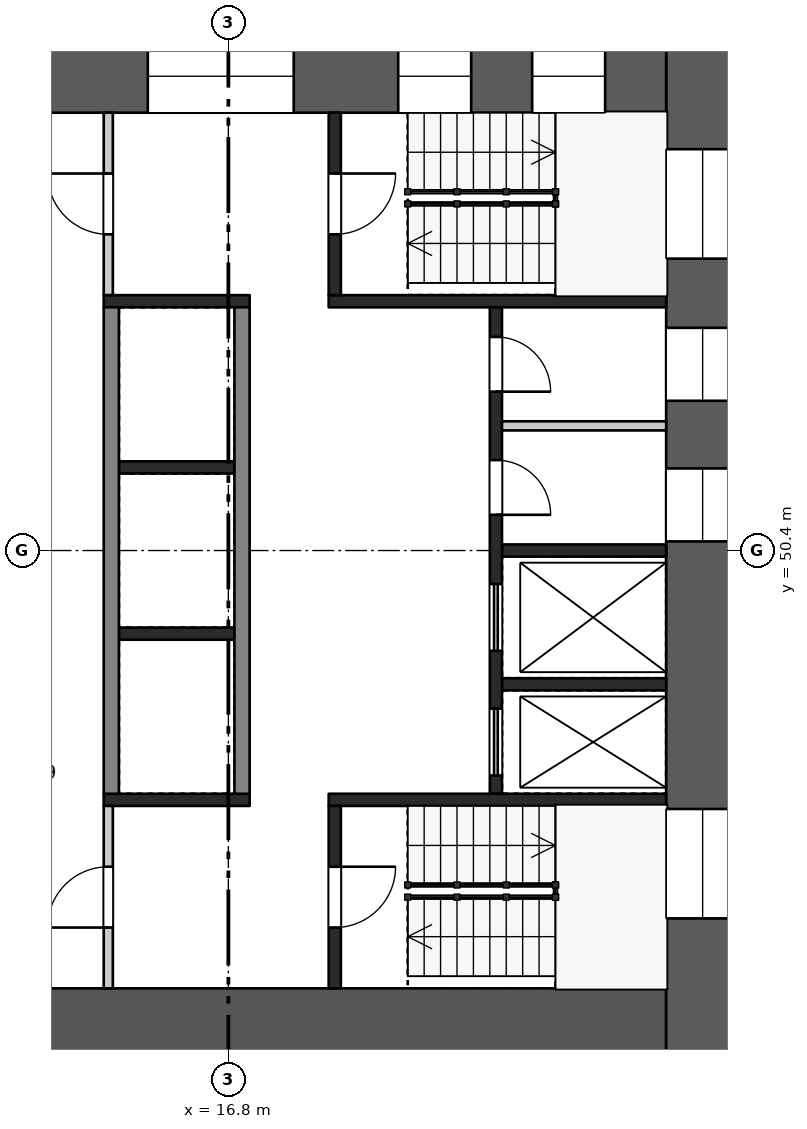
"""IFC4 building model, lengths in metres.
Left out: names, types, materials, properties, quantities, classifications, styles, units other than length and angle.
Written with IfcOpenShell. Run it as: python <this file> out.ifc"""

import sys

from ifc_helpers import new_model, si_unit, direction, frame, frame_2d, origin, place, context, subcontext, project, spatial, rectangle, extrude, element, fill, save


model = new_model("IFC4")
c1 = context("Model", 3, precision=1e-05, world=origin(), true_north=direction((0.0, 1.0)))
c2 = subcontext(c1, "Body", "Model", "MODEL_VIEW")
j1 = project(units=[si_unit("LENGTHUNIT", "METRE"), si_unit("PLANEANGLEUNIT", "RADIAN")], contexts=[c1])
p1 = place(None, origin())
s1 = spatial("IfcSite", under=j1, at=p1, CompositionType="ELEMENT")
p2 = place(p1, origin())
s2 = spatial("IfcBuilding", under=s1, at=p2, CompositionType="ELEMENT")
p3 = place(p2, frame((0.0, 0.0, 67.2)))
s3 = spatial("IfcBuildingStorey", under=s2, at=p3, CompositionType="ELEMENT", Elevation=67.2)
p4 = place(p3, frame((24.6, 58.8, 0.0), z_axis=(0.0, 0.0, 1.0), x_axis=(0.0, -1.0, 0.0)))
e1 = element("IfcWall", 1, at=p4, inside=s3, PredefinedType="SHEAR", context=c2, shape_type="SweptSolid", body=[
    extrude(rectangle(XDim=16.8, YDim=1.2, at=frame_2d((8.4, 0.0))), origin(), (0.0, 0.0, 1.0), 3.22),
])
p5 = place(p4, frame((1.8, 0.0, 0.5)))
e2 = element("IfcOpeningElement", 2, at=p5, cuts=e1, PredefinedType="OPENING", context=c2, shape_type="SweptSolid", body=[
    extrude(rectangle(XDim=1.8, YDim=2.4, at=frame_2d((0.9, 1.2))), frame((0.0, 0.61, 0.0), z_axis=(0.0, -1.0, 0.0), x_axis=(1.0, 0.0, 0.0)), (0.0, 0.0, 1.0), 1.22),
])
p6 = place(p4, frame((4.738, 0.0, 1.6)))
e3 = element("IfcOpeningElement", 3, at=p6, cuts=e1, PredefinedType="OPENING", context=c2, shape_type="SweptSolid", body=[
    extrude(rectangle(XDim=1.2, YDim=1.2, at=frame_2d((0.6, 0.6))), frame((0.0, 0.61, 0.0), z_axis=(0.0, -1.0, 0.0), x_axis=(1.0, 0.0, 0.0)), (0.0, 0.0, 1.0), 1.22),
])
p7 = place(p4, frame((7.05, 0.0, 1.6)))
e4 = element("IfcOpeningElement", 4, at=p7, cuts=e1, PredefinedType="OPENING", context=c2, shape_type="SweptSolid", body=[
    extrude(rectangle(XDim=1.2, YDim=1.2, at=frame_2d((0.6, 0.6))), frame((0.0, 0.61, 0.0), z_axis=(0.0, -1.0, 0.0), x_axis=(1.0, 0.0, 0.0)), (0.0, 0.0, 1.0), 1.22),
])
p8 = place(p4, frame((12.65, 0.0, 0.5)))
e5 = element("IfcOpeningElement", 5, at=p8, cuts=e1, PredefinedType="OPENING", context=c2, shape_type="SweptSolid", body=[
    extrude(rectangle(XDim=1.8, YDim=2.4, at=frame_2d((0.9, 1.2))), frame((0.0, 0.61, 0.0), z_axis=(0.0, -1.0, 0.0), x_axis=(1.0, 0.0, 0.0)), (0.0, 0.0, 1.0), 1.22),
])
p9 = place(p3, frame((9.6, 58.2, 0.0), z_axis=(0.0, 0.0, 1.0), x_axis=(1.0, 0.0, 0.0)))
e6 = element("IfcWall", 6, at=p9, inside=s3, PredefinedType="SHEAR", context=c2, shape_type="SweptSolid", body=[
    extrude(rectangle(XDim=14.4, YDim=1.2, at=frame_2d((7.2, 0.0))), origin(), (0.0, 0.0, 1.0), 3.22),
])
p10 = place(p9, frame((1.105, 0.0, 0.6)))
e7 = element("IfcOpeningElement", 7, at=p10, cuts=e6, PredefinedType="OPENING", context=c2, shape_type="SweptSolid", body=[
    extrude(rectangle(XDim=3.0, YDim=2.1, at=frame_2d((1.5, 1.05))), frame((0.0, 0.61, 0.0), z_axis=(0.0, -1.0, 0.0), x_axis=(1.0, 0.0, 0.0)), (0.0, 0.0, 1.0), 1.22),
])
p11 = place(p9, frame((5.875, 0.0, 0.6)))
e8 = element("IfcOpeningElement", 8, at=p11, cuts=e6, PredefinedType="OPENING", context=c2, shape_type="SweptSolid", body=[
    extrude(rectangle(XDim=2.4, YDim=2.1, at=frame_2d((1.2, 1.05))), frame((0.0, 0.61, 0.0), z_axis=(0.0, -1.0, 0.0), x_axis=(1.0, 0.0, 0.0)), (0.0, 0.0, 1.0), 1.22),
])
p12 = place(p9, frame((9.993, 0.0, 0.5)))
e9 = element("IfcOpeningElement", 9, at=p12, cuts=e6, PredefinedType="OPENING", context=c2, shape_type="SweptSolid", body=[
    extrude(rectangle(XDim=1.2, YDim=2.4, at=frame_2d((0.6, 1.2))), frame((0.0, 0.61, 0.0), z_axis=(0.0, -1.0, 0.0), x_axis=(1.0, 0.0, 0.0)), (0.0, 0.0, 1.0), 1.22),
])
p13 = place(p9, frame((12.197, 0.0, 0.5)))
e10 = element("IfcOpeningElement", 10, at=p13, cuts=e6, PredefinedType="OPENING", context=c2, shape_type="SweptSolid", body=[
    extrude(rectangle(XDim=1.2, YDim=2.4, at=frame_2d((0.6, 1.2))), frame((0.0, 0.61, 0.0), z_axis=(0.0, -1.0, 0.0), x_axis=(1.0, 0.0, 0.0)), (0.0, 0.0, 1.0), 1.22),
])
p14 = place(p3, frame((9.6, 42.6, 0.0), z_axis=(0.0, 0.0, 1.0), x_axis=(1.0, 0.0, 0.0)))
e11 = element("IfcWall", 11, at=p14, inside=s3, PredefinedType="SHEAR", context=c2, shape_type="SweptSolid", body=[
    extrude(rectangle(XDim=14.4, YDim=1.2, at=frame_2d((7.2, 0.0))), origin(), (0.0, 0.0, 1.0), 3.22),
])
p15 = place(p14, frame((2.1, 0.0, 0.0)))
e12 = element("IfcOpeningElement", 12, at=p15, cuts=e11, PredefinedType="OPENING", context=c2, shape_type="SweptSolid", body=[
    extrude(rectangle(XDim=1.8, YDim=2.1, at=frame_2d((0.9, 1.05))), frame((0.0, 0.61, 0.0), z_axis=(0.0, -1.0, 0.0), x_axis=(1.0, 0.0, 0.0)), (0.0, 0.0, 1.0), 1.22),
])
for number, where, z_axis, x_axis in (
    (13, (15.0, 51.767, 0.0), (0.0, 0.0, 1.0), (1.0, 0.0, 0.0)),
    (14, (15.0, 49.033, 0.0), (0.0, 0.0, 1.0), (1.0, 0.0, 0.0)),
):
    element("IfcWall", number, at=place(p3, frame(where, z_axis=z_axis, x_axis=x_axis)), inside=s3, PredefinedType="SHEAR", context=c2, shape_type="SweptSolid", body=[
        extrude(rectangle(XDim=1.9, YDim=0.2, at=frame_2d((0.95, 0.0))), origin(), (0.0, 0.0, 1.0), 3.22),
    ])
for number, where, z_axis, x_axis in (
    (15, (14.875, 54.4, 0.0), (0.0, 0.0, 1.0), (0.0, -1.0, 0.0)),
    (16, (17.025, 54.4, 0.0), (0.0, 0.0, 1.0), (0.0, -1.0, 0.0)),
):
    element("IfcWall", number, at=place(p3, frame(where, z_axis=z_axis, x_axis=x_axis)), inside=s3, PredefinedType="SHEAR", context=c2, shape_type="SweptSolid", body=[
        extrude(rectangle(XDim=8.0, YDim=0.25, at=frame_2d((4.0, 0.0))), origin(), (0.0, 0.0, 1.0), 3.22),
    ])
for number, where, z_axis, x_axis in (
    (17, (21.3, 50.4, 0.0), (0.0, 0.0, 1.0), (1.0, 0.0, 0.0)),
    (18, (21.3, 48.2, 0.0), (0.0, 0.0, 1.0), (1.0, 0.0, 0.0)),
):
    element("IfcWall", number, at=place(p3, frame(where, z_axis=z_axis, x_axis=x_axis)), inside=s3, PredefinedType="SHEAR", context=c2, shape_type="SweptSolid", body=[
        extrude(rectangle(XDim=2.7, YDim=0.2, at=frame_2d((1.35, 0.0))), origin(), (0.0, 0.0, 1.0), 3.22),
    ])
p16 = place(p3, frame((21.3, 52.45, 0.0), z_axis=(0.0, 0.0, 1.0), x_axis=(1.0, 0.0, 0.0)))
e19 = element("IfcWall", 19, at=p16, inside=s3, PredefinedType="PARTITIONING", context=c2, shape_type="SweptSolid", body=[
    extrude(rectangle(XDim=2.7, YDim=0.15, at=frame_2d((1.35, 0.0))), origin(), (0.0, 0.0, 1.0), 3.22),
])
p17 = place(p3, frame((21.2, 54.4, 0.0), z_axis=(0.0, 0.0, 1.0), x_axis=(0.0, -1.0, 0.0)))
e20 = element("IfcWall", 20, at=p17, inside=s3, PredefinedType="SHEAR", context=c2, shape_type="SweptSolid", body=[
    extrude(rectangle(XDim=8.0, YDim=0.2, at=frame_2d((4.0, 0.0))), origin(), (0.0, 0.0, 1.0), 3.22),
])
p18 = place(p17, frame((0.488, 0.0, 0.0)))
e21 = element("IfcOpeningElement", 21, at=p18, cuts=e20, PredefinedType="OPENING", context=c2, shape_type="SweptSolid", body=[
    extrude(rectangle(XDim=0.9, YDim=2.1, at=frame_2d((0.45, 1.05))), frame((0.0, 0.11, 0.0), z_axis=(0.0, -1.0, 0.0), x_axis=(1.0, 0.0, 0.0)), (0.0, 0.0, 1.0), 0.22),
])
p19 = place(p17, frame((2.512, 0.0, 0.0)))
e22 = element("IfcOpeningElement", 22, at=p19, cuts=e20, PredefinedType="OPENING", context=c2, shape_type="SweptSolid", body=[
    extrude(rectangle(XDim=0.9, YDim=2.1, at=frame_2d((0.45, 1.05))), frame((0.0, 0.11, 0.0), z_axis=(0.0, -1.0, 0.0), x_axis=(1.0, 0.0, 0.0)), (0.0, 0.0, 1.0), 0.22),
])
p20 = place(p17, frame((4.55, 0.0, 0.0)))
e23 = element("IfcOpeningElement", 23, at=p20, cuts=e20, PredefinedType="OPENING", context=c2, shape_type="SweptSolid", body=[
    extrude(rectangle(XDim=1.1, YDim=2.1, at=frame_2d((0.55, 1.05))), frame((0.0, 0.11, 0.0), z_axis=(0.0, -1.0, 0.0), x_axis=(1.0, 0.0, 0.0)), (0.0, 0.0, 1.0), 0.22),
])
p21 = place(p17, frame((6.6, 0.0, 0.0)))
e24 = element("IfcOpeningElement", 24, at=p21, cuts=e20, PredefinedType="OPENING", context=c2, shape_type="SweptSolid", body=[
    extrude(rectangle(XDim=1.1, YDim=2.1, at=frame_2d((0.55, 1.05))), frame((0.0, 0.11, 0.0), z_axis=(0.0, -1.0, 0.0), x_axis=(1.0, 0.0, 0.0)), (0.0, 0.0, 1.0), 0.22),
])
p22 = place(p3, frame((14.75, 54.5, 0.0), z_axis=(0.0, 0.0, 1.0), x_axis=(1.0, 0.0, 0.0)))
e25 = element("IfcWall", 25, at=p22, inside=s3, PredefinedType="SHEAR", context=c2, shape_type="SweptSolid", body=[
    extrude(rectangle(XDim=2.4, YDim=0.2, at=frame_2d((1.2, 0.0))), origin(), (0.0, 0.0, 1.0), 3.22),
])
p23 = place(p3, frame((18.45, 54.5, 0.0), z_axis=(0.0, 0.0, 1.0), x_axis=(1.0, 0.0, 0.0)))
e26 = element("IfcWall", 26, at=p23, inside=s3, PredefinedType="SHEAR", context=c2, shape_type="SweptSolid", body=[
    extrude(rectangle(XDim=5.55, YDim=0.2, at=frame_2d((2.775, 0.0))), origin(), (0.0, 0.0, 1.0), 3.22),
])
p24 = place(p3, frame((14.825, 57.6, 0.0), z_axis=(0.0, 0.0, 1.0), x_axis=(0.0, -1.0, 0.0)))
e27 = element("IfcWall", 27, at=p24, inside=s3, PredefinedType="PARTITIONING", context=c2, shape_type="SweptSolid", body=[
    extrude(rectangle(XDim=3.0, YDim=0.15, at=frame_2d((1.5, 0.0))), origin(), (0.0, 0.0, 1.0), 3.22),
])
p25 = place(p24, frame((1.0, 0.0, 0.0)))
e28 = element("IfcOpeningElement", 28, at=p25, cuts=e27, PredefinedType="OPENING", context=c2, shape_type="SweptSolid", body=[
    extrude(rectangle(XDim=1.0, YDim=2.1, at=frame_2d((0.5, 1.05))), frame((0.0, 0.085, 0.0), z_axis=(0.0, -1.0, 0.0), x_axis=(1.0, 0.0, 0.0)), (0.0, 0.0, 1.0), 0.17),
])
p26 = place(p3, frame((18.55, 57.6, 0.0), z_axis=(0.0, 0.0, 1.0), x_axis=(0.0, -1.0, 0.0)))
e29 = element("IfcWall", 29, at=p26, inside=s3, PredefinedType="SHEAR", context=c2, shape_type="SweptSolid", body=[
    extrude(rectangle(XDim=3.0, YDim=0.2, at=frame_2d((1.5, 0.0))), origin(), (0.0, 0.0, 1.0), 3.22),
])
p27 = place(p26, frame((1.0, 0.0, 0.0)))
e30 = element("IfcOpeningElement", 30, at=p27, cuts=e29, PredefinedType="OPENING", context=c2, shape_type="SweptSolid", body=[
    extrude(rectangle(XDim=1.0, YDim=2.1, at=frame_2d((0.5, 1.05))), frame((0.0, 0.11, 0.0), z_axis=(0.0, -1.0, 0.0), x_axis=(1.0, 0.0, 0.0)), (0.0, 0.0, 1.0), 0.22),
])
p28 = place(p3, frame((14.75, 46.3, 0.0), z_axis=(0.0, 0.0, 1.0), x_axis=(1.0, 0.0, 0.0)))
e31 = element("IfcWall", 31, at=p28, inside=s3, PredefinedType="SHEAR", context=c2, shape_type="SweptSolid", body=[
    extrude(rectangle(XDim=2.4, YDim=0.2, at=frame_2d((1.2, 0.0))), origin(), (0.0, 0.0, 1.0), 3.22),
])
p29 = place(p3, frame((18.45, 46.3, 0.0), z_axis=(0.0, 0.0, 1.0), x_axis=(1.0, 0.0, 0.0)))
e32 = element("IfcWall", 32, at=p29, inside=s3, PredefinedType="SHEAR", context=c2, shape_type="SweptSolid", body=[
    extrude(rectangle(XDim=5.55, YDim=0.2, at=frame_2d((2.775, 0.0))), origin(), (0.0, 0.0, 1.0), 3.22),
])
p30 = place(p3, frame((14.825, 46.2, 0.0), z_axis=(0.0, 0.0, 1.0), x_axis=(0.0, -1.0, 0.0)))
e33 = element("IfcWall", 33, at=p30, inside=s3, PredefinedType="PARTITIONING", context=c2, shape_type="SweptSolid", body=[
    extrude(rectangle(XDim=3.0, YDim=0.15, at=frame_2d((1.5, 0.0))), origin(), (0.0, 0.0, 1.0), 3.22),
])
p31 = place(p30, frame((1.0, 0.0, 0.0)))
e34 = element("IfcOpeningElement", 34, at=p31, cuts=e33, PredefinedType="OPENING", context=c2, shape_type="SweptSolid", body=[
    extrude(rectangle(XDim=1.0, YDim=2.1, at=frame_2d((0.5, 1.05))), frame((0.0, 0.085, 0.0), z_axis=(0.0, -1.0, 0.0), x_axis=(1.0, 0.0, 0.0)), (0.0, 0.0, 1.0), 0.17),
])
p32 = place(p3, frame((18.55, 46.2, 0.0), z_axis=(0.0, 0.0, 1.0), x_axis=(0.0, -1.0, 0.0)))
e35 = element("IfcWall", 35, at=p32, inside=s3, PredefinedType="SHEAR", context=c2, shape_type="SweptSolid", body=[
    extrude(rectangle(XDim=3.0, YDim=0.2, at=frame_2d((1.5, 0.0))), origin(), (0.0, 0.0, 1.0), 3.22),
])
p33 = place(p32, frame((1.0, 0.0, 0.0)))
e36 = element("IfcOpeningElement", 36, at=p33, cuts=e35, PredefinedType="OPENING", context=c2, shape_type="SweptSolid", body=[
    extrude(rectangle(XDim=1.0, YDim=2.1, at=frame_2d((0.5, 1.05))), frame((0.0, 0.11, 0.0), z_axis=(0.0, -1.0, 0.0), x_axis=(1.0, 0.0, 0.0)), (0.0, 0.0, 1.0), 0.22),
])
p34 = place(p18, origin())
e37 = element("IfcDoor", 37, at=p34, inside=s3, OperationType="SINGLE_SWING_RIGHT", PredefinedType="DOOR", context=c2, shape_type="SweptSolid", body=[
    extrude(rectangle(XDim=0.9, YDim=2.1, at=frame_2d((0.45, 1.05))), frame((0.0, 0.025, 0.0), z_axis=(0.0, -1.0, 0.0), x_axis=(1.0, 0.0, 0.0)), (0.0, 0.0, 1.0), 0.05),
])
fill(e21, e37)
p35 = place(p19, origin())
e38 = element("IfcDoor", 38, at=p35, inside=s3, OperationType="SINGLE_SWING_RIGHT", PredefinedType="DOOR", context=c2, shape_type="SweptSolid", body=[
    extrude(rectangle(XDim=0.9, YDim=2.1, at=frame_2d((0.45, 1.05))), frame((0.0, 0.025, 0.0), z_axis=(0.0, -1.0, 0.0), x_axis=(1.0, 0.0, 0.0)), (0.0, 0.0, 1.0), 0.05),
])
fill(e22, e38)
p36 = place(p20, origin())
e39 = element("IfcDoor", 39, at=p36, inside=s3, OperationType="DOUBLE_DOOR_SLIDING", PredefinedType="DOOR", context=c2, shape_type="SweptSolid", body=[
    extrude(rectangle(XDim=1.1, YDim=2.1, at=frame_2d((0.55, 1.05))), frame((0.0, 0.025, 0.0), z_axis=(0.0, -1.0, 0.0), x_axis=(1.0, 0.0, 0.0)), (0.0, 0.0, 1.0), 0.05),
])
fill(e23, e39)
p37 = place(p21, origin())
e40 = element("IfcDoor", 40, at=p37, inside=s3, OperationType="DOUBLE_DOOR_SLIDING", PredefinedType="DOOR", context=c2, shape_type="SweptSolid", body=[
    extrude(rectangle(XDim=1.1, YDim=2.1, at=frame_2d((0.55, 1.05))), frame((0.0, 0.025, 0.0), z_axis=(0.0, -1.0, 0.0), x_axis=(1.0, 0.0, 0.0)), (0.0, 0.0, 1.0), 0.05),
])
fill(e24, e40)
p38 = place(p25, frame((1.0, 0.0, 0.0), z_axis=(0.0, 0.0, 1.0), x_axis=(-1.0, 0.0, 0.0)))
e41 = element("IfcDoor", 41, at=p38, inside=s3, OperationType="SINGLE_SWING_RIGHT", PredefinedType="DOOR", context=c2, shape_type="SweptSolid", body=[
    extrude(rectangle(XDim=1.0, YDim=2.1, at=frame_2d((0.5, 1.05))), frame((0.0, 0.025, 0.0), z_axis=(0.0, -1.0, 0.0), x_axis=(1.0, 0.0, 0.0)), (0.0, 0.0, 1.0), 0.05),
])
fill(e28, e41)
p39 = place(p27, origin())
e42 = element("IfcDoor", 42, at=p39, inside=s3, OperationType="SINGLE_SWING_LEFT", PredefinedType="DOOR", context=c2, shape_type="SweptSolid", body=[
    extrude(rectangle(XDim=1.0, YDim=2.1, at=frame_2d((0.5, 1.05))), frame((0.0, 0.025, 0.0), z_axis=(0.0, -1.0, 0.0), x_axis=(1.0, 0.0, 0.0)), (0.0, 0.0, 1.0), 0.05),
])
fill(e30, e42)
p40 = place(p31, frame((1.0, 0.0, 0.0), z_axis=(0.0, 0.0, 1.0), x_axis=(-1.0, 0.0, 0.0)))
e43 = element("IfcDoor", 43, at=p40, inside=s3, OperationType="SINGLE_SWING_LEFT", PredefinedType="DOOR", context=c2, shape_type="SweptSolid", body=[
    extrude(rectangle(XDim=1.0, YDim=2.1, at=frame_2d((0.5, 1.05))), frame((0.0, 0.025, 0.0), z_axis=(0.0, -1.0, 0.0), x_axis=(1.0, 0.0, 0.0)), (0.0, 0.0, 1.0), 0.05),
])
fill(e34, e43)
p41 = place(p33, origin())
e44 = element("IfcDoor", 44, at=p41, inside=s3, OperationType="SINGLE_SWING_LEFT", PredefinedType="DOOR", context=c2, shape_type="SweptSolid", body=[
    extrude(rectangle(XDim=1.0, YDim=2.1, at=frame_2d((0.5, 1.05))), frame((0.0, 0.025, 0.0), z_axis=(0.0, -1.0, 0.0), x_axis=(1.0, 0.0, 0.0)), (0.0, 0.0, 1.0), 0.05),
])
fill(e36, e44)
p42 = place(p5, origin())
e45 = element("IfcWindow", 45, at=p42, inside=s3, PartitioningType="SINGLE_PANEL", PredefinedType="WINDOW", context=c2, shape_type="SweptSolid", body=[
    extrude(rectangle(XDim=1.8, YDim=2.4, at=frame_2d((0.9, 1.2))), frame((0.0, 0.03, 0.0), z_axis=(0.0, -1.0, 0.0), x_axis=(1.0, 0.0, 0.0)), (0.0, 0.0, 1.0), 0.06),
])
fill(e2, e45)
p43 = place(p6, origin())
e46 = element("IfcWindow", 46, at=p43, inside=s3, PartitioningType="SINGLE_PANEL", PredefinedType="WINDOW", context=c2, shape_type="SweptSolid", body=[
    extrude(rectangle(XDim=1.2, YDim=1.2, at=frame_2d((0.6, 0.6))), frame((0.0, 0.03, 0.0), z_axis=(0.0, -1.0, 0.0), x_axis=(1.0, 0.0, 0.0)), (0.0, 0.0, 1.0), 0.06),
])
fill(e3, e46)
p44 = place(p7, origin())
e47 = element("IfcWindow", 47, at=p44, inside=s3, PartitioningType="SINGLE_PANEL", PredefinedType="WINDOW", context=c2, shape_type="SweptSolid", body=[
    extrude(rectangle(XDim=1.2, YDim=1.2, at=frame_2d((0.6, 0.6))), frame((0.0, 0.03, 0.0), z_axis=(0.0, -1.0, 0.0), x_axis=(1.0, 0.0, 0.0)), (0.0, 0.0, 1.0), 0.06),
])
fill(e4, e47)
p45 = place(p8, origin())
e48 = element("IfcWindow", 48, at=p45, inside=s3, PartitioningType="SINGLE_PANEL", PredefinedType="WINDOW", context=c2, shape_type="SweptSolid", body=[
    extrude(rectangle(XDim=1.8, YDim=2.4, at=frame_2d((0.9, 1.2))), frame((0.0, 0.03, 0.0), z_axis=(0.0, -1.0, 0.0), x_axis=(1.0, 0.0, 0.0)), (0.0, 0.0, 1.0), 0.06),
])
fill(e5, e48)
p46 = place(p11, origin())
e49 = element("IfcWindow", 49, at=p46, inside=s3, PartitioningType="SINGLE_PANEL", PredefinedType="WINDOW", context=c2, shape_type="SweptSolid", body=[
    extrude(rectangle(XDim=2.4, YDim=2.1, at=frame_2d((1.2, 1.05))), frame((0.0, 0.03, 0.0), z_axis=(0.0, -1.0, 0.0), x_axis=(1.0, 0.0, 0.0)), (0.0, 0.0, 1.0), 0.06),
])
fill(e8, e49)
p47 = place(p12, origin())
e50 = element("IfcWindow", 50, at=p47, inside=s3, PartitioningType="SINGLE_PANEL", PredefinedType="WINDOW", context=c2, shape_type="SweptSolid", body=[
    extrude(rectangle(XDim=1.2, YDim=2.4, at=frame_2d((0.6, 1.2))), frame((0.0, 0.03, 0.0), z_axis=(0.0, -1.0, 0.0), x_axis=(1.0, 0.0, 0.0)), (0.0, 0.0, 1.0), 0.06),
])
fill(e9, e50)
p48 = place(p13, origin())
e51 = element("IfcWindow", 51, at=p48, inside=s3, PartitioningType="SINGLE_PANEL", PredefinedType="WINDOW", context=c2, shape_type="SweptSolid", body=[
    extrude(rectangle(XDim=1.2, YDim=2.4, at=frame_2d((0.6, 1.2))), frame((0.0, 0.03, 0.0), z_axis=(0.0, -1.0, 0.0), x_axis=(1.0, 0.0, 0.0)), (0.0, 0.0, 1.0), 0.06),
])
fill(e10, e51)
save(model, sys.argv[1])
